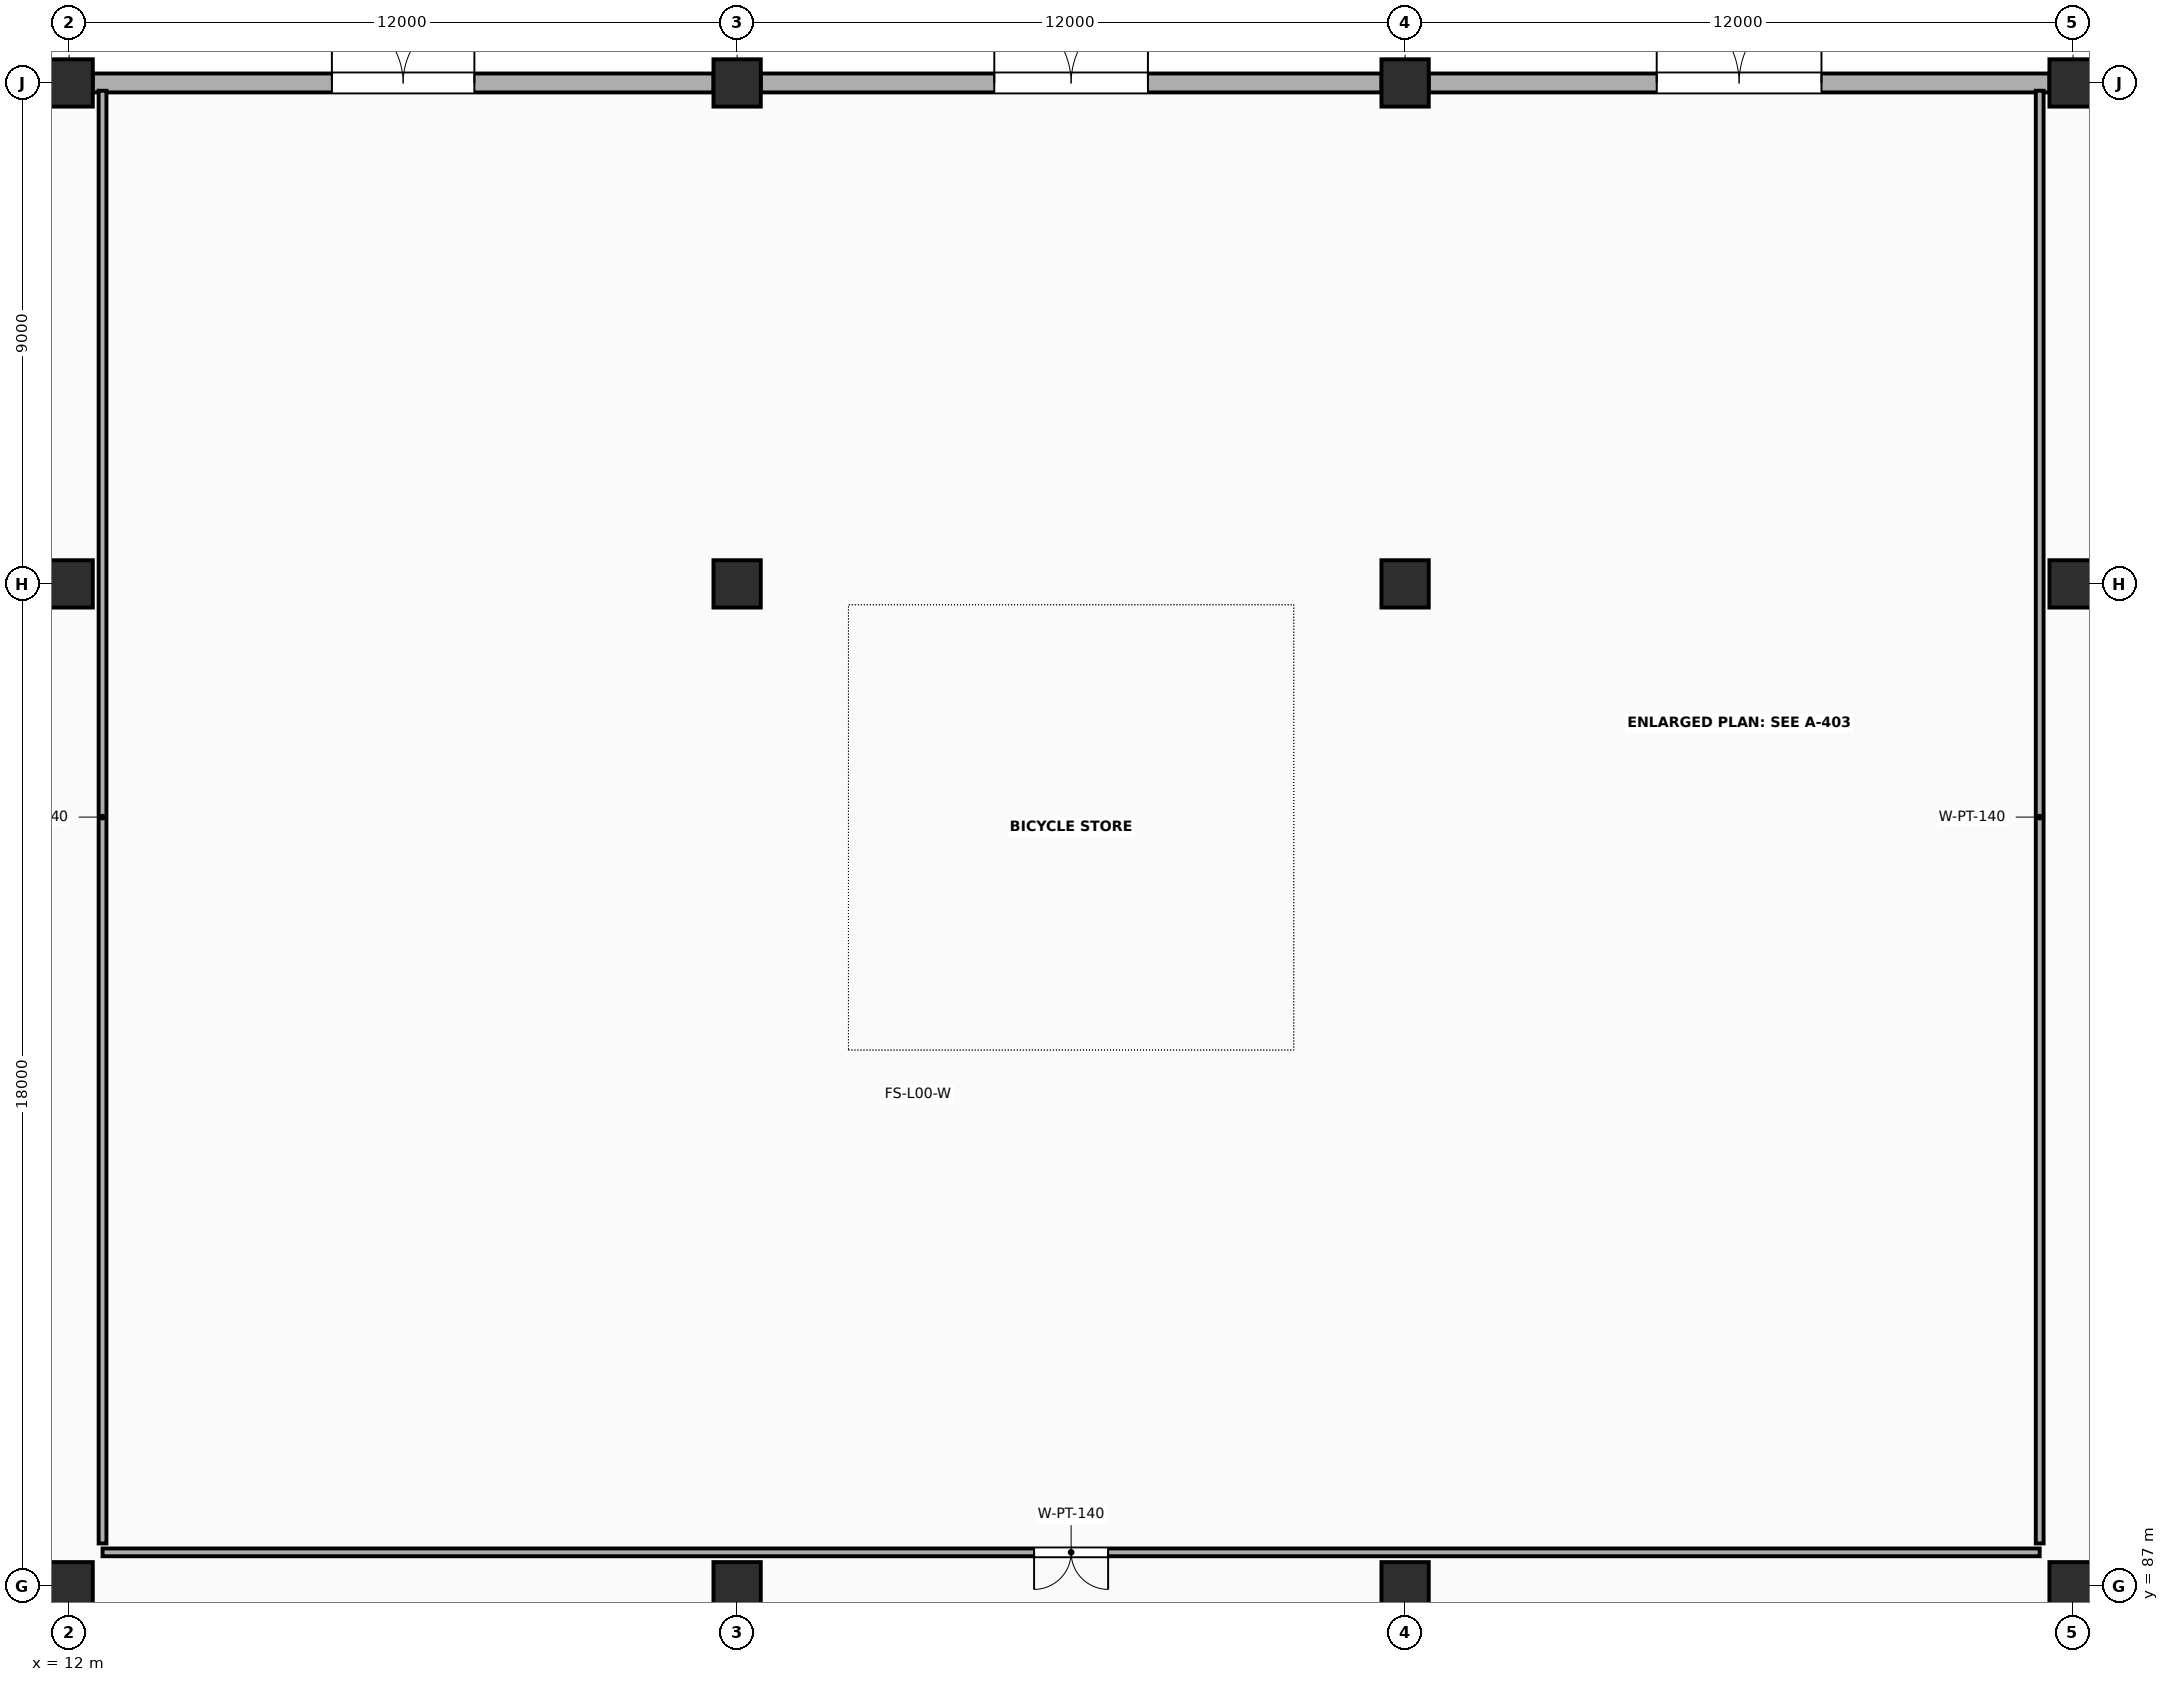
"""IFC4 building model, lengths in metres.
Left out: names, types, materials, properties, quantities, classifications, styles, units other than length and angle.
Written with IfcOpenShell. Run it as: python <this file> out.ifc"""

import sys

from ifc_helpers import new_model, si_unit, direction, frame, frame_2d, origin, origin_2d, place, context, subcontext, project, spatial, rectangle, extrude, element, fill, save


model = new_model("IFC4")
c1 = context("Model", 3, precision=1e-05, world=origin(), true_north=direction((0.0, 1.0)))
c2 = subcontext(c1, "Body", "Model", "MODEL_VIEW")
j1 = project(units=[si_unit("LENGTHUNIT", "METRE"), si_unit("PLANEANGLEUNIT", "RADIAN")], contexts=[c1])
p1 = place(None, origin())
s1 = spatial("IfcSite", under=j1, at=p1, CompositionType="ELEMENT")
p2 = place(p1, origin())
s2 = spatial("IfcBuilding", under=s1, at=p2, CompositionType="ELEMENT")
p3 = place(p2, origin())
s3 = spatial("IfcBuildingStorey", under=s2, at=p3, CompositionType="ELEMENT", Elevation=0.0)
for number, where, z_axis, x_axis in (
    (1, (12.0, 87.0, 0.0), (0.0, 0.0, 1.0), (1.0, 0.0, 0.0)),
    (2, (12.0, 105.0, 0.0), (0.0, 0.0, 1.0), (1.0, 0.0, 0.0)),
    (3, (12.0, 114.0, 0.0), (0.0, 0.0, 1.0), (1.0, 0.0, 0.0)),
    (4, (24.0, 87.0, 0.0), (0.0, 0.0, 1.0), (1.0, 0.0, 0.0)),
    (5, (24.0, 105.0, 0.0), (0.0, 0.0, 1.0), (1.0, 0.0, 0.0)),
    (6, (24.0, 114.0, 0.0), (0.0, 0.0, 1.0), (1.0, 0.0, 0.0)),
    (7, (36.0, 87.0, 0.0), (0.0, 0.0, 1.0), (1.0, 0.0, 0.0)),
    (8, (36.0, 105.0, 0.0), (0.0, 0.0, 1.0), (1.0, 0.0, 0.0)),
    (9, (36.0, 114.0, 0.0), (0.0, 0.0, 1.0), (1.0, 0.0, 0.0)),
    (10, (48.0, 87.0, 0.0), (0.0, 0.0, 1.0), (1.0, 0.0, 0.0)),
    (11, (48.0, 105.0, 0.0), (0.0, 0.0, 1.0), (1.0, 0.0, 0.0)),
    (12, (48.0, 114.0, 0.0), (0.0, 0.0, 1.0), (1.0, 0.0, 0.0)),
):
    element("IfcColumn", number, at=place(p3, frame(where, z_axis=z_axis, x_axis=x_axis)), inside=s3, PredefinedType="COLUMN", context=c2, shape_type="SweptSolid", body=[
        extrude(rectangle(XDim=0.85, YDim=0.85, at=origin_2d()), origin(), (0.0, 0.0, 1.0), 5.4),
    ])
p4 = place(p3, frame((12.423, 114.0, 0.0), z_axis=(0.0, 0.0, 1.0), x_axis=(1.0, 0.0, 0.0)))
e13 = element("IfcWall", 13, at=p4, inside=s3, PredefinedType="SOLIDWALL", context=c2, shape_type="SweptSolid", body=[
    extrude(rectangle(XDim=11.154, YDim=0.34, at=frame_2d((5.577, 0.0))), origin(), (0.0, 0.0, 1.0), 3.85),
])
p5 = place(p4, frame((4.297, 0.0, 0.0)))
e14 = element("IfcOpeningElement", 14, at=p5, cuts=e13, PredefinedType="OPENING", context=c2, shape_type="SweptSolid", body=[
    extrude(rectangle(XDim=2.56, YDim=2.48, at=frame_2d((1.28, 1.24))), frame((0.0, 0.185, 0.0), z_axis=(0.0, -1.0, 0.0), x_axis=(1.0, 0.0, 0.0)), (0.0, 0.0, 1.0), 0.37),
])
p6 = place(p3, frame((24.423, 114.0, 0.0), z_axis=(0.0, 0.0, 1.0), x_axis=(1.0, 0.0, 0.0)))
e15 = element("IfcWall", 15, at=p6, inside=s3, PredefinedType="SOLIDWALL", context=c2, shape_type="SweptSolid", body=[
    extrude(rectangle(XDim=11.154, YDim=0.34, at=frame_2d((5.577, 0.0))), origin(), (0.0, 0.0, 1.0), 3.85),
])
p7 = place(p6, frame((4.197, 0.0, 0.0)))
e16 = element("IfcOpeningElement", 16, at=p7, cuts=e15, PredefinedType="OPENING", context=c2, shape_type="SweptSolid", body=[
    extrude(rectangle(XDim=2.76, YDim=2.54, at=frame_2d((1.38, 1.27))), frame((0.0, 0.185, 0.0), z_axis=(0.0, -1.0, 0.0), x_axis=(1.0, 0.0, 0.0)), (0.0, 0.0, 1.0), 0.37),
])
p8 = place(p3, frame((36.423, 114.0, 0.0), z_axis=(0.0, 0.0, 1.0), x_axis=(1.0, 0.0, 0.0)))
e17 = element("IfcWall", 17, at=p8, inside=s3, PredefinedType="SOLIDWALL", context=c2, shape_type="SweptSolid", body=[
    extrude(rectangle(XDim=11.154, YDim=0.34, at=frame_2d((5.577, 0.0))), origin(), (0.0, 0.0, 1.0), 3.85),
])
p9 = place(p8, frame((4.097, 0.0, 0.0)))
e18 = element("IfcOpeningElement", 18, at=p9, cuts=e17, PredefinedType="OPENING", context=c2, shape_type="SweptSolid", body=[
    extrude(rectangle(XDim=2.96, YDim=2.6, at=frame_2d((1.48, 1.3))), frame((0.0, 0.185, 0.0), z_axis=(0.0, -1.0, 0.0), x_axis=(1.0, 0.0, 0.0)), (0.0, 0.0, 1.0), 0.37),
])
p10 = place(p3, frame((12.6, 87.6, 0.0), z_axis=(0.0, 0.0, 1.0), x_axis=(1.0, 0.0, 0.0)))
e19 = element("IfcWall", 19, at=p10, inside=s3, PredefinedType="PARTITIONING", context=c2, shape_type="SweptSolid", body=[
    extrude(rectangle(XDim=34.8, YDim=0.14, at=frame_2d((17.4, 0.0))), origin(), (0.0, 0.0, 1.0), 2.75),
])
p11 = place(p10, frame((16.735, 0.0, 0.0)))
e20 = element("IfcOpeningElement", 20, at=p11, cuts=e19, PredefinedType="OPENING", context=c2, shape_type="SweptSolid", body=[
    extrude(rectangle(XDim=1.33, YDim=2.2, at=frame_2d((0.665, 1.1))), frame((0.0, 0.085, 0.0), z_axis=(0.0, -1.0, 0.0), x_axis=(1.0, 0.0, 0.0)), (0.0, 0.0, 1.0), 0.17),
])
for number, where, z_axis, x_axis in (
    (21, (12.6, 87.76, 0.0), (0.0, 0.0, 1.0), (0.0, 1.0, 0.0)),
    (22, (47.4, 87.76, 0.0), (0.0, 0.0, 1.0), (0.0, 1.0, 0.0)),
):
    element("IfcWall", number, at=place(p3, frame(where, z_axis=z_axis, x_axis=x_axis)), inside=s3, PredefinedType="PARTITIONING", context=c2, shape_type="SweptSolid", body=[
        extrude(rectangle(XDim=26.1, YDim=0.14, at=frame_2d((13.05, 0.0))), origin(), (0.0, 0.0, 1.0), 2.75),
    ])
p12 = place(p5, origin())
e23 = element("IfcDoor", 23, at=p12, inside=s3, OperationType="DOUBLE_DOOR_SINGLE_SWING", PredefinedType="GATE", context=c2, shape_type="SweptSolid", body=[
    extrude(rectangle(XDim=2.56, YDim=2.48, at=frame_2d((1.28, 1.24))), frame((0.0, 0.025, 0.0), z_axis=(0.0, -1.0, 0.0), x_axis=(1.0, 0.0, 0.0)), (0.0, 0.0, 1.0), 0.05),
])
fill(e14, e23)
p13 = place(p7, origin())
e24 = element("IfcDoor", 24, at=p13, inside=s3, OperationType="DOUBLE_DOOR_SINGLE_SWING", PredefinedType="GATE", context=c2, shape_type="SweptSolid", body=[
    extrude(rectangle(XDim=2.76, YDim=2.54, at=frame_2d((1.38, 1.27))), frame((0.0, 0.025, 0.0), z_axis=(0.0, -1.0, 0.0), x_axis=(1.0, 0.0, 0.0)), (0.0, 0.0, 1.0), 0.05),
])
fill(e16, e24)
p14 = place(p9, origin())
e25 = element("IfcDoor", 25, at=p14, inside=s3, OperationType="DOUBLE_DOOR_SINGLE_SWING", PredefinedType="GATE", context=c2, shape_type="SweptSolid", body=[
    extrude(rectangle(XDim=2.96, YDim=2.6, at=frame_2d((1.48, 1.3))), frame((0.0, 0.025, 0.0), z_axis=(0.0, -1.0, 0.0), x_axis=(1.0, 0.0, 0.0)), (0.0, 0.0, 1.0), 0.05),
])
fill(e18, e25)
p15 = place(p11, origin())
e26 = element("IfcDoor", 26, at=p15, inside=s3, OperationType="DOUBLE_DOOR_SINGLE_SWING", PredefinedType="DOOR", context=c2, shape_type="SweptSolid", body=[
    extrude(rectangle(XDim=1.33, YDim=2.2, at=frame_2d((0.665, 1.1))), frame((0.0, 0.025, 0.0), z_axis=(0.0, -1.0, 0.0), x_axis=(1.0, 0.0, 0.0)), (0.0, 0.0, 1.0), 0.05),
])
fill(e20, e26)
save(model, sys.argv[1])
